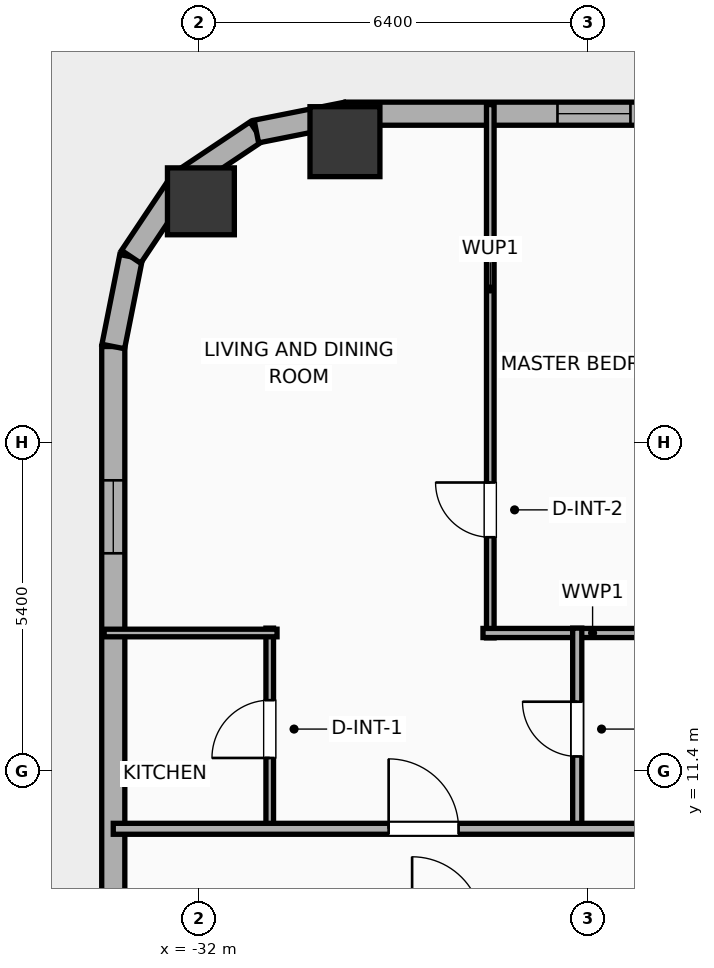
"""IFC4 building model, lengths in metres.
Left out: names, types, materials, properties, quantities, classifications, styles, units other than length and angle.
Written with IfcOpenShell. Run it as: python <this file> out.ifc"""

import sys

from ifc_helpers import new_model, si_unit, direction, frame, frame_2d, origin, origin_2d, place, context, subcontext, project, spatial, rectangle, hollow_rectangle, hollow_circle, extrude, element, fill, save


model = new_model("IFC4")
c1 = context("Model", 3, precision=1e-05, world=origin(), true_north=direction((0.0, 1.0)))
c2 = subcontext(c1, "Body", "Model", "MODEL_VIEW")
j1 = project(units=[si_unit("LENGTHUNIT", "METRE"), si_unit("PLANEANGLEUNIT", "RADIAN")], contexts=[c1])
p1 = place(None, origin())
s1 = spatial("IfcSite", under=j1, at=p1, CompositionType="ELEMENT")
p2 = place(p1, origin())
s2 = spatial("IfcBuilding", under=s1, at=p2, CompositionType="ELEMENT")
p3 = place(p2, frame((0.0, 0.0, 26.0)))
s3 = spatial("IfcBuildingStorey", under=s2, at=p3, CompositionType="ELEMENT", Elevation=26.0)
p4 = place(p3, frame((-29.6, 21.75, -0.25), z_axis=(0.0, 0.0, 1.0), x_axis=(1.0, 0.0, 0.0)))
e1 = element("IfcColumn", 1, at=p4, inside=s3, PredefinedType="COLUMN", context=c2, shape_type="SweptSolid", body=[
    extrude(hollow_rectangle(XDim=1.15, YDim=1.15, WallThickness=0.04, at=origin_2d()), origin(), (0.0, 0.0, 1.0), 4.15),
])
p5 = place(p3, frame((-31.969, 20.769, -0.25), z_axis=(0.0, 0.0, 1.0), x_axis=(1.0, 0.0, 0.0)))
e2 = element("IfcColumn", 2, at=p5, inside=s3, PredefinedType="COLUMN", context=c2, shape_type="SweptSolid", body=[
    extrude(hollow_circle(Radius=0.55, WallThickness=0.036, at=origin_2d()), origin(), (0.0, 0.0, 1.0), 4.15),
])
p6 = place(p3, frame((-33.41, -18.381, 0.0), z_axis=(0.0, 0.0, 1.0), x_axis=(0.0, 1.0, 0.0)))
e3 = element("IfcWall", 3, at=p6, inside=s3, PredefinedType="ELEMENTEDWALL", context=c2, shape_type="SweptSolid", body=[
    extrude(rectangle(XDim=36.763, YDim=0.38, at=frame_2d((18.381, 0.0))), origin(), (0.0, 0.0, 1.0), 2.54),
])
p7 = place(p6, frame((33.362, 0.0, 0.75)))
e4 = element("IfcOpeningElement", 4, at=p7, cuts=e3, PredefinedType="OPENING", context=c2, shape_type="SweptSolid", body=[
    extrude(rectangle(XDim=1.2, YDim=1.63, at=frame_2d((0.6, 0.815))), frame((0.0, 0.2, 0.0), z_axis=(0.0, -1.0, 0.0), x_axis=(1.0, 0.0, 0.0)), (0.0, 0.0, 1.0), 0.4),
])
p8 = place(p6, frame((22.301, 0.0, 0.75)))
e5 = element("IfcOpeningElement", 5, at=p8, cuts=e3, PredefinedType="OPENING", context=c2, shape_type="SweptSolid", body=[
    extrude(rectangle(XDim=1.2, YDim=1.63, at=frame_2d((0.6, 0.815))), frame((0.0, 0.2, 0.0), z_axis=(0.0, -1.0, 0.0), x_axis=(1.0, 0.0, 0.0)), (0.0, 0.0, 1.0), 0.4),
])
p9 = place(p6, frame((13.401, 0.0, 0.75)))
e6 = element("IfcOpeningElement", 6, at=p9, cuts=e3, PredefinedType="OPENING", context=c2, shape_type="SweptSolid", body=[
    extrude(rectangle(XDim=1.2, YDim=1.63, at=frame_2d((0.6, 0.815))), frame((0.0, 0.2, 0.0), z_axis=(0.0, -1.0, 0.0), x_axis=(1.0, 0.0, 0.0)), (0.0, 0.0, 1.0), 0.4),
])
p10 = place(p3, frame((-33.41, 18.381, 0.0), z_axis=(0.0, 0.0, 1.0), x_axis=(0.195086038585, 0.980786132421, 0.0)))
e7 = element("IfcWall", 7, at=p10, inside=s3, PredefinedType="ELEMENTEDWALL", context=c2, shape_type="SweptSolid", body=[
    extrude(rectangle(XDim=1.504, YDim=0.38, at=frame_2d((0.752, 0.0))), origin(), (0.0, 0.0, 1.0), 3.65),
])
p11 = place(p3, frame((-33.116, 19.857, 0.0), z_axis=(0.0, 0.0, 1.0), x_axis=(0.555572577804, 0.831468045563, 0.0)))
e8 = element("IfcWall", 8, at=p11, inside=s3, PredefinedType="ELEMENTEDWALL", context=c2, shape_type="SweptSolid", body=[
    extrude(rectangle(XDim=1.485, YDim=0.38, at=frame_2d((0.742, 0.0))), origin(), (0.0, 0.0, 1.0), 3.65),
])
p12 = place(p3, frame((-32.292, 21.091, 0.0), z_axis=(0.0, 0.0, 1.0), x_axis=(0.831442848281, 0.555610286119, 0.0)))
e9 = element("IfcWall", 9, at=p12, inside=s3, PredefinedType="ELEMENTEDWALL", context=c2, shape_type="SweptSolid", body=[
    extrude(rectangle(XDim=1.485, YDim=0.38, at=frame_2d((0.743, 0.0))), origin(), (0.0, 0.0, 1.0), 2.54),
])
p13 = place(p3, frame((-31.057, 21.917, 0.0), z_axis=(0.0, 0.0, 1.0), x_axis=(0.980786132421, 0.195086038585, 0.0)))
e10 = element("IfcWall", 10, at=p13, inside=s3, PredefinedType="ELEMENTEDWALL", context=c2, shape_type="SweptSolid", body=[
    extrude(rectangle(XDim=1.504, YDim=0.38, at=frame_2d((0.752, 0.0))), origin(), (0.0, 0.0, 1.0), 2.54),
])
p14 = place(p3, frame((-29.581, 22.21, 0.0), z_axis=(0.0, 0.0, 1.0), x_axis=(1.0, 0.0, 0.0)))
e11 = element("IfcWall", 11, at=p14, inside=s3, PredefinedType="ELEMENTEDWALL", context=c2, shape_type="SweptSolid", body=[
    extrude(rectangle(XDim=51.963, YDim=0.38, at=frame_2d((25.981, 0.0))), origin(), (0.0, 0.0, 1.0), 2.54),
])
p15 = place(p14, frame((6.61, 0.0, 0.75)))
e12 = element("IfcOpeningElement", 12, at=p15, cuts=e11, PredefinedType="OPENING", context=c2, shape_type="SweptSolid", body=[
    extrude(rectangle(XDim=2.4, YDim=1.63, at=frame_2d((1.2, 0.815))), frame((0.0, 0.2, 0.0), z_axis=(0.0, -1.0, 0.0), x_axis=(1.0, 0.0, 0.0)), (0.0, 0.0, 1.0), 0.4),
])
p16 = place(p14, frame((24.781, 0.0, 0.75)))
e13 = element("IfcOpeningElement", 13, at=p16, cuts=e11, PredefinedType="OPENING", context=c2, shape_type="SweptSolid", body=[
    extrude(rectangle(XDim=2.4, YDim=1.63, at=frame_2d((1.2, 0.815))), frame((0.0, 0.2, 0.0), z_axis=(0.0, -1.0, 0.0), x_axis=(1.0, 0.0, 0.0)), (0.0, 0.0, 1.0), 0.4),
])
p17 = place(p14, frame((42.952, 0.0, 0.75)))
e14 = element("IfcOpeningElement", 14, at=p17, cuts=e11, PredefinedType="OPENING", context=c2, shape_type="SweptSolid", body=[
    extrude(rectangle(XDim=2.4, YDim=1.63, at=frame_2d((1.2, 0.815))), frame((0.0, 0.2, 0.0), z_axis=(0.0, -1.0, 0.0), x_axis=(1.0, 0.0, 0.0)), (0.0, 0.0, 1.0), 0.4),
])
p18 = place(p14, frame((3.476, 0.0, 0.75)))
e15 = element("IfcOpeningElement", 15, at=p18, cuts=e11, PredefinedType="OPENING", context=c2, shape_type="SweptSolid", body=[
    extrude(rectangle(XDim=1.2, YDim=1.63, at=frame_2d((0.6, 0.815))), frame((0.0, 0.2, 0.0), z_axis=(0.0, -1.0, 0.0), x_axis=(1.0, 0.0, 0.0)), (0.0, 0.0, 1.0), 0.4),
])
p19 = place(p14, frame((11.236, 0.0, 0.75)))
e16 = element("IfcOpeningElement", 16, at=p19, cuts=e11, PredefinedType="OPENING", context=c2, shape_type="SweptSolid", body=[
    extrude(rectangle(XDim=1.2, YDim=1.63, at=frame_2d((0.6, 0.815))), frame((0.0, 0.2, 0.0), z_axis=(0.0, -1.0, 0.0), x_axis=(1.0, 0.0, 0.0)), (0.0, 0.0, 1.0), 0.4),
])
p20 = place(p14, frame((14.576, 0.0, 0.75)))
e17 = element("IfcOpeningElement", 17, at=p20, cuts=e11, PredefinedType="OPENING", context=c2, shape_type="SweptSolid", body=[
    extrude(rectangle(XDim=1.2, YDim=1.63, at=frame_2d((0.6, 0.815))), frame((0.0, 0.2, 0.0), z_axis=(0.0, -1.0, 0.0), x_axis=(1.0, 0.0, 0.0)), (0.0, 0.0, 1.0), 0.4),
])
p21 = place(p14, frame((18.276, 0.0, 0.75)))
e18 = element("IfcOpeningElement", 18, at=p21, cuts=e11, PredefinedType="OPENING", context=c2, shape_type="SweptSolid", body=[
    extrude(rectangle(XDim=1.2, YDim=1.63, at=frame_2d((0.6, 0.815))), frame((0.0, 0.2, 0.0), z_axis=(0.0, -1.0, 0.0), x_axis=(1.0, 0.0, 0.0)), (0.0, 0.0, 1.0), 0.4),
])
p22 = place(p14, frame((21.976, 0.0, 0.75)))
e19 = element("IfcOpeningElement", 19, at=p22, cuts=e11, PredefinedType="OPENING", context=c2, shape_type="SweptSolid", body=[
    extrude(rectangle(XDim=1.2, YDim=1.63, at=frame_2d((0.6, 0.815))), frame((0.0, 0.2, 0.0), z_axis=(0.0, -1.0, 0.0), x_axis=(1.0, 0.0, 0.0)), (0.0, 0.0, 1.0), 0.4),
])
p23 = place(p14, frame((29.136, 0.0, 0.75)))
e20 = element("IfcOpeningElement", 20, at=p23, cuts=e11, PredefinedType="OPENING", context=c2, shape_type="SweptSolid", body=[
    extrude(rectangle(XDim=1.2, YDim=1.63, at=frame_2d((0.6, 0.815))), frame((0.0, 0.2, 0.0), z_axis=(0.0, -1.0, 0.0), x_axis=(1.0, 0.0, 0.0)), (0.0, 0.0, 1.0), 0.4),
])
p24 = place(p14, frame((33.076, 0.0, 0.75)))
e21 = element("IfcOpeningElement", 21, at=p24, cuts=e11, PredefinedType="OPENING", context=c2, shape_type="SweptSolid", body=[
    extrude(rectangle(XDim=1.2, YDim=1.63, at=frame_2d((0.6, 0.815))), frame((0.0, 0.2, 0.0), z_axis=(0.0, -1.0, 0.0), x_axis=(1.0, 0.0, 0.0)), (0.0, 0.0, 1.0), 0.4),
])
p25 = place(p14, frame((36.776, 0.0, 0.75)))
e22 = element("IfcOpeningElement", 22, at=p25, cuts=e11, PredefinedType="OPENING", context=c2, shape_type="SweptSolid", body=[
    extrude(rectangle(XDim=1.2, YDim=1.63, at=frame_2d((0.6, 0.815))), frame((0.0, 0.2, 0.0), z_axis=(0.0, -1.0, 0.0), x_axis=(1.0, 0.0, 0.0)), (0.0, 0.0, 1.0), 0.4),
])
p26 = place(p14, frame((39.931, 0.0, 0.75)))
e23 = element("IfcOpeningElement", 23, at=p26, cuts=e11, PredefinedType="OPENING", context=c2, shape_type="SweptSolid", body=[
    extrude(rectangle(XDim=0.85, YDim=1.63, at=frame_2d((0.425, 0.815))), frame((0.0, 0.2, 0.0), z_axis=(0.0, -1.0, 0.0), x_axis=(1.0, 0.0, 0.0)), (0.0, 0.0, 1.0), 0.4),
])
p27 = place(p14, frame((47.469, 0.0, 0.75)))
e24 = element("IfcOpeningElement", 24, at=p27, cuts=e11, PredefinedType="OPENING", context=c2, shape_type="SweptSolid", body=[
    extrude(rectangle(XDim=1.2, YDim=1.63, at=frame_2d((0.6, 0.815))), frame((0.0, 0.2, 0.0), z_axis=(0.0, -1.0, 0.0), x_axis=(1.0, 0.0, 0.0)), (0.0, 0.0, 1.0), 0.4),
])
p28 = place(p14, frame((49.581, 0.0, 0.75)))
e25 = element("IfcOpeningElement", 25, at=p28, cuts=e11, PredefinedType="OPENING", context=c2, shape_type="SweptSolid", body=[
    extrude(rectangle(XDim=1.2, YDim=1.63, at=frame_2d((0.6, 0.815))), frame((0.0, 0.2, 0.0), z_axis=(0.0, -1.0, 0.0), x_axis=(1.0, 0.0, 0.0)), (0.0, 0.0, 1.0), 0.4),
])
p29 = place(p3, frame((-27.21, 13.59, 0.0), z_axis=(0.0, 0.0, 1.0), x_axis=(0.0, 1.0, 0.0)))
e26 = element("IfcWall", 26, at=p29, inside=s3, PredefinedType="PARTITIONING", context=c2, shape_type="SweptSolid", body=[
    extrude(rectangle(XDim=8.77, YDim=0.125, at=frame_2d((4.385, 0.0))), origin(), (0.0, 0.0, 1.0), 3.65),
])
p30 = place(p29, frame((1.655, 0.0, 0.0)))
e27 = element("IfcOpeningElement", 27, at=p30, cuts=e26, PredefinedType="OPENING", context=c2, shape_type="SweptSolid", body=[
    extrude(rectangle(XDim=0.9, YDim=2.05, at=frame_2d((0.45, 1.025))), frame((0.0, 0.073, 0.0), z_axis=(0.0, -1.0, 0.0), x_axis=(1.0, 0.0, 0.0)), (0.0, 0.0, 1.0), 0.145),
])
p31 = place(p3, frame((-27.33, 13.67, 0.0), z_axis=(0.0, 0.0, 1.0), x_axis=(1.0, 0.0, 0.0)))
e28 = element("IfcWall", 28, at=p31, inside=s3, PredefinedType="PLUMBINGWALL", context=c2, shape_type="SweptSolid", body=[
    extrude(rectangle(XDim=3.605, YDim=0.15, at=frame_2d((1.802, 0.0))), origin(), (0.0, 0.0, 1.0), 3.65),
])
p32 = place(p3, frame((-30.837, 10.43, 0.0), z_axis=(0.0, 0.0, 1.0), x_axis=(0.0, 1.0, 0.0)))
e29 = element("IfcWall", 29, at=p32, inside=s3, PredefinedType="PARTITIONING", context=c2, shape_type="SweptSolid", body=[
    extrude(rectangle(XDim=3.32, YDim=0.125, at=frame_2d((1.66, 0.0))), origin(), (0.0, 0.0, 1.0), 3.65),
])
p33 = place(p32, frame((1.185, 0.0, 0.0)))
e30 = element("IfcOpeningElement", 30, at=p33, cuts=e29, PredefinedType="OPENING", context=c2, shape_type="SweptSolid", body=[
    extrude(rectangle(XDim=0.95, YDim=2.05, at=frame_2d((0.475, 1.025))), frame((0.0, 0.073, 0.0), z_axis=(0.0, -1.0, 0.0), x_axis=(1.0, 0.0, 0.0)), (0.0, 0.0, 1.0), 0.145),
])
p34 = place(p3, frame((-33.56, 13.67, 0.0), z_axis=(0.0, 0.0, 1.0), x_axis=(1.0, 0.0, 0.0)))
e31 = element("IfcWall", 31, at=p34, inside=s3, PredefinedType="PARTITIONING", context=c2, shape_type="SweptSolid", body=[
    extrude(rectangle(XDim=2.843, YDim=0.125, at=frame_2d((1.421, 0.0))), origin(), (0.0, 0.0, 1.0), 3.65),
])
p35 = place(p3, frame((-25.78, 10.43, 0.0), z_axis=(0.0, 0.0, 1.0), x_axis=(0.0, 1.0, 0.0)))
e32 = element("IfcWall", 32, at=p35, inside=s3, PredefinedType="PLUMBINGWALL", context=c2, shape_type="SweptSolid", body=[
    extrude(rectangle(XDim=3.32, YDim=0.15, at=frame_2d((1.66, 0.0))), origin(), (0.0, 0.0, 1.0), 3.65),
])
p36 = place(p35, frame((1.21, 0.0, 0.0)))
e33 = element("IfcOpeningElement", 33, at=p36, cuts=e32, PredefinedType="OPENING", context=c2, shape_type="SweptSolid", body=[
    extrude(rectangle(XDim=0.9, YDim=2.05, at=frame_2d((0.45, 1.025))), frame((0.0, 0.085, 0.0), z_axis=(0.0, -1.0, 0.0), x_axis=(1.0, 0.0, 0.0)), (0.0, 0.0, 1.0), 0.17),
])
p37 = place(p3, frame((-33.41, 10.45, 0.0), z_axis=(0.0, 0.0, 1.0), x_axis=(1.0, 0.0, 0.0)))
e34 = element("IfcWall", 34, at=p37, inside=s3, PredefinedType="PARTITIONING", context=c2, shape_type="SweptSolid", body=[
    extrude(rectangle(XDim=59.62, YDim=0.18, at=frame_2d((29.81, 0.0))), origin(), (0.0, 0.0, 1.0), 3.65),
])
p38 = place(p37, frame((4.529, 0.0, 0.0)))
e35 = element("IfcOpeningElement", 35, at=p38, cuts=e34, PredefinedType="OPENING", context=c2, shape_type="SweptSolid", body=[
    extrude(rectangle(XDim=1.15, YDim=2.05, at=frame_2d((0.575, 1.025))), frame((0.0, 0.1, 0.0), z_axis=(0.0, -1.0, 0.0), x_axis=(1.0, 0.0, 0.0)), (0.0, 0.0, 1.0), 0.2),
])
p39 = place(p37, frame((12.899, 0.0, 0.0)))
e36 = element("IfcOpeningElement", 36, at=p39, cuts=e34, PredefinedType="OPENING", context=c2, shape_type="SweptSolid", body=[
    extrude(rectangle(XDim=1.15, YDim=2.05, at=frame_2d((0.575, 1.025))), frame((0.0, 0.1, 0.0), z_axis=(0.0, -1.0, 0.0), x_axis=(1.0, 0.0, 0.0)), (0.0, 0.0, 1.0), 0.2),
])
p40 = place(p37, frame((20.298, 0.0, 0.0)))
e37 = element("IfcOpeningElement", 37, at=p40, cuts=e34, PredefinedType="OPENING", context=c2, shape_type="SweptSolid", body=[
    extrude(rectangle(XDim=1.15, YDim=2.05, at=frame_2d((0.575, 1.025))), frame((0.0, 0.1, 0.0), z_axis=(0.0, -1.0, 0.0), x_axis=(1.0, 0.0, 0.0)), (0.0, 0.0, 1.0), 0.2),
])
p41 = place(p37, frame((27.703, 0.0, 0.0)))
e38 = element("IfcOpeningElement", 38, at=p41, cuts=e34, PredefinedType="OPENING", context=c2, shape_type="SweptSolid", body=[
    extrude(rectangle(XDim=1.15, YDim=2.05, at=frame_2d((0.575, 1.025))), frame((0.0, 0.1, 0.0), z_axis=(0.0, -1.0, 0.0), x_axis=(1.0, 0.0, 0.0)), (0.0, 0.0, 1.0), 0.2),
])
p42 = place(p37, frame((35.102, 0.0, 0.0)))
e39 = element("IfcOpeningElement", 39, at=p42, cuts=e34, PredefinedType="OPENING", context=c2, shape_type="SweptSolid", body=[
    extrude(rectangle(XDim=1.15, YDim=2.05, at=frame_2d((0.575, 1.025))), frame((0.0, 0.1, 0.0), z_axis=(0.0, -1.0, 0.0), x_axis=(1.0, 0.0, 0.0)), (0.0, 0.0, 1.0), 0.2),
])
p43 = place(p37, frame((42.5, 0.0, 0.0)))
e40 = element("IfcOpeningElement", 40, at=p43, cuts=e34, PredefinedType="OPENING", context=c2, shape_type="SweptSolid", body=[
    extrude(rectangle(XDim=1.15, YDim=2.05, at=frame_2d((0.575, 1.025))), frame((0.0, 0.1, 0.0), z_axis=(0.0, -1.0, 0.0), x_axis=(1.0, 0.0, 0.0)), (0.0, 0.0, 1.0), 0.2),
])
p44 = place(p37, frame((48.099, 0.0, 0.0)))
e41 = element("IfcOpeningElement", 41, at=p44, cuts=e34, PredefinedType="OPENING", context=c2, shape_type="SweptSolid", body=[
    extrude(rectangle(XDim=1.15, YDim=2.05, at=frame_2d((0.575, 1.025))), frame((0.0, 0.1, 0.0), z_axis=(0.0, -1.0, 0.0), x_axis=(1.0, 0.0, 0.0)), (0.0, 0.0, 1.0), 0.2),
])
p45 = place(p37, frame((56.117, 0.0, 0.0)))
e42 = element("IfcOpeningElement", 42, at=p45, cuts=e34, PredefinedType="OPENING", context=c2, shape_type="SweptSolid", body=[
    extrude(rectangle(XDim=0.9, YDim=2.05, at=frame_2d((0.45, 1.025))), frame((0.0, 0.1, 0.0), z_axis=(0.0, -1.0, 0.0), x_axis=(1.0, 0.0, 0.0)), (0.0, 0.0, 1.0), 0.2),
])
p46 = place(p7, origin())
e43 = element("IfcWindow", 43, at=p46, inside=s3, PartitioningType="SINGLE_PANEL", PredefinedType="WINDOW", context=c2, shape_type="SweptSolid", body=[
    extrude(rectangle(XDim=1.2, YDim=1.63, at=frame_2d((0.6, 0.815))), frame((0.0, 0.03, 0.0), z_axis=(0.0, -1.0, 0.0), x_axis=(1.0, 0.0, 0.0)), (0.0, 0.0, 1.0), 0.06),
])
fill(e4, e43)
p47 = place(p18, origin())
e44 = element("IfcWindow", 44, at=p47, inside=s3, PartitioningType="SINGLE_PANEL", PredefinedType="WINDOW", context=c2, shape_type="SweptSolid", body=[
    extrude(rectangle(XDim=1.2, YDim=1.63, at=frame_2d((0.6, 0.815))), frame((0.0, 0.03, 0.0), z_axis=(0.0, -1.0, 0.0), x_axis=(1.0, 0.0, 0.0)), (0.0, 0.0, 1.0), 0.06),
])
fill(e15, e44)
p48 = place(p30, origin())
e45 = element("IfcDoor", 45, at=p48, inside=s3, OperationType="SINGLE_SWING_RIGHT", PredefinedType="DOOR", context=c2, shape_type="SweptSolid", body=[
    extrude(rectangle(XDim=0.9, YDim=2.05, at=frame_2d((0.45, 1.025))), frame((0.0, 0.025, 0.0), z_axis=(0.0, -1.0, 0.0), x_axis=(1.0, 0.0, 0.0)), (0.0, 0.0, 1.0), 0.05),
])
fill(e27, e45)
p49 = place(p33, origin())
e46 = element("IfcDoor", 46, at=p49, inside=s3, OperationType="SINGLE_SWING_LEFT", PredefinedType="DOOR", context=c2, shape_type="SweptSolid", body=[
    extrude(rectangle(XDim=0.95, YDim=2.05, at=frame_2d((0.475, 1.025))), frame((0.0, 0.025, 0.0), z_axis=(0.0, -1.0, 0.0), x_axis=(1.0, 0.0, 0.0)), (0.0, 0.0, 1.0), 0.05),
])
fill(e30, e46)
p50 = place(p36, origin())
e47 = element("IfcDoor", 47, at=p50, inside=s3, OperationType="SINGLE_SWING_RIGHT", PredefinedType="DOOR", context=c2, shape_type="SweptSolid", body=[
    extrude(rectangle(XDim=0.9, YDim=2.05, at=frame_2d((0.45, 1.025))), frame((0.0, 0.025, 0.0), z_axis=(0.0, -1.0, 0.0), x_axis=(1.0, 0.0, 0.0)), (0.0, 0.0, 1.0), 0.05),
])
fill(e33, e47)
p51 = place(p38, origin())
e48 = element("IfcDoor", 48, at=p51, inside=s3, OperationType="SINGLE_SWING_LEFT", PredefinedType="DOOR", context=c2, shape_type="SweptSolid", body=[
    extrude(rectangle(XDim=1.15, YDim=2.05, at=frame_2d((0.575, 1.025))), frame((0.0, 0.025, 0.0), z_axis=(0.0, -1.0, 0.0), x_axis=(1.0, 0.0, 0.0)), (0.0, 0.0, 1.0), 0.05),
])
fill(e35, e48)
save(model, sys.argv[1])
